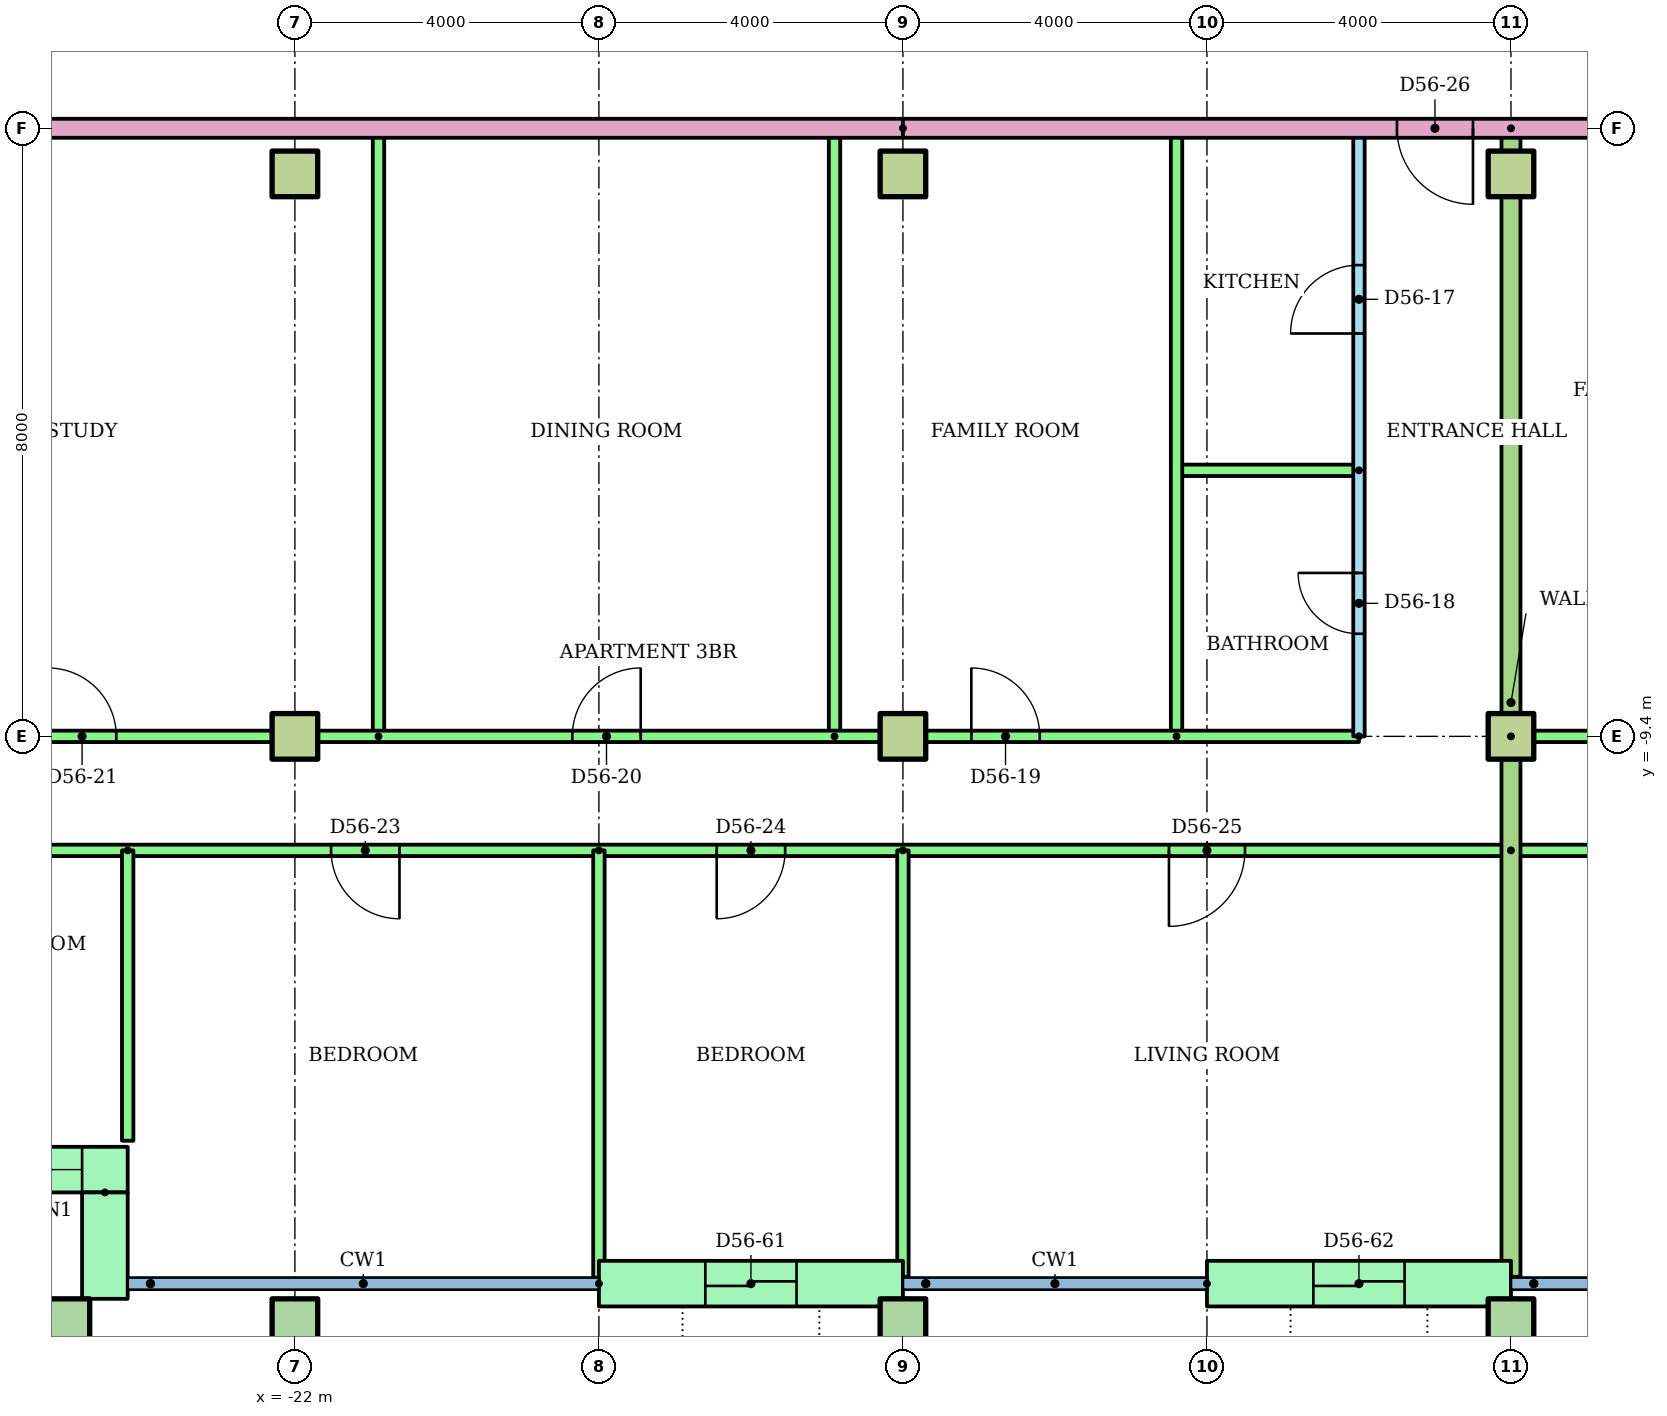
"""IFC4 building model, lengths in metres.
Left out: names, types, materials, properties, quantities, classifications, styles, units other than length and angle.
Written with IfcOpenShell. Run it as: python <this file> out.ifc"""

import sys

from ifc_helpers import new_model, si_unit, direction, frame, frame_2d, origin, origin_2d, place, context, subcontext, project, spatial, rectangle, hollow_rectangle, extrude, element, fill, save


model = new_model("IFC4")
c1 = context("Model", 3, precision=1e-05, world=origin(), true_north=direction((0.0, 1.0)))
c2 = subcontext(c1, "Body", "Model", "MODEL_VIEW")
j1 = project(units=[si_unit("LENGTHUNIT", "METRE"), si_unit("PLANEANGLEUNIT", "RADIAN")], contexts=[c1])
p1 = place(None, origin())
s1 = spatial("IfcSite", under=j1, at=p1, CompositionType="ELEMENT")
p2 = place(p1, origin())
s2 = spatial("IfcBuilding", under=s1, at=p2, CompositionType="ELEMENT")
p3 = place(p2, frame((0.0, 0.0, 217.2)))
s3 = spatial("IfcBuildingStorey", under=s2, at=p3, CompositionType="ELEMENT", Elevation=217.2)
for number, where in (
    (1, (-25.0, -17.1, 0.0)),
    (2, (-22.0, -17.1, 0.0)),
    (3, (-14.0, -17.1, 0.0)),
    (4, (-6.0, -17.1, 0.0)),
):
    element("IfcColumn", number, at=place(p3, frame(where)), inside=s3, PredefinedType="COLUMN", context=c2, shape_type="SweptSolid", body=[
        extrude(hollow_rectangle(XDim=0.6, YDim=0.6, WallThickness=0.03, at=origin_2d()), origin(), (0.0, 0.0, 1.0), 3.2),
    ])
for number, where in (
    (5, (-22.0, -9.4, 0.0)),
    (6, (-14.0, -9.4, 0.0)),
    (7, (-6.0, -9.4, 0.0)),
    (8, (-22.0, -2.0, 0.0)),
    (9, (-14.0, -2.0, 0.0)),
    (10, (-6.0, -2.0, 0.0)),
):
    element("IfcColumn", number, at=place(p3, frame(where)), inside=s3, PredefinedType="COLUMN", context=c2, shape_type="SweptSolid", body=[
        extrude(rectangle(XDim=0.6, YDim=0.6, at=origin_2d()), origin(), (0.0, 0.0, 1.0), 3.2),
    ])
p4 = place(p3, frame((-26.3, -15.1, 0.0)))
e11 = element("IfcWall", 11, at=p4, inside=s3, PredefinedType="STANDARD", context=c2, shape_type="SweptSolid", body=[
    extrude(rectangle(XDim=2.1, YDim=0.6, at=frame_2d((1.05, 0.0))), origin(), (0.0, 0.0, 1.0), 2.92),
])
p5 = place(p4, frame((0.6, 0.0, 0.9)))
e12 = element("IfcOpeningElement", 12, at=p5, cuts=e11, PredefinedType="OPENING", context=c2, shape_type="SweptSolid", body=[
    extrude(rectangle(XDim=0.9, YDim=1.5, at=frame_2d((0.45, 0.75))), frame((0.0, 0.31, 0.0), z_axis=(0.0, -1.0, 0.0), x_axis=(1.0, 0.0, 0.0)), (0.0, 0.0, 1.0), 0.62),
])
p6 = place(p3, frame((-24.5, -15.4, 0.0), z_axis=(0.0, 0.0, 1.0), x_axis=(0.0, -1.0, 0.0)))
e13 = element("IfcWall", 13, at=p6, inside=s3, PredefinedType="STANDARD", context=c2, shape_type="SweptSolid", body=[
    extrude(rectangle(XDim=1.4, YDim=0.6, at=frame_2d((0.7, 0.0))), origin(), (0.0, 0.0, 1.0), 2.92),
])
p7 = place(p3, frame((-18.0, -16.6, 0.0)))
e14 = element("IfcWall", 14, at=p7, inside=s3, PredefinedType="STANDARD", context=c2, shape_type="SweptSolid", body=[
    extrude(rectangle(XDim=4.0, YDim=0.6, at=frame_2d((2.0, 0.0))), origin(), (0.0, 0.0, 1.0), 2.92),
])
p8 = place(p7, frame((1.4, 0.0, 0.0)))
e15 = element("IfcOpeningElement", 15, at=p8, cuts=e14, PredefinedType="OPENING", context=c2, shape_type="SweptSolid", body=[
    extrude(rectangle(XDim=1.2, YDim=2.1, at=frame_2d((0.6, 1.05))), frame((0.0, 0.31, 0.0), z_axis=(0.0, -1.0, 0.0), x_axis=(1.0, 0.0, 0.0)), (0.0, 0.0, 1.0), 0.62),
])
p9 = place(p3, frame((-10.0, -16.6, 0.0)))
e16 = element("IfcWall", 16, at=p9, inside=s3, PredefinedType="STANDARD", context=c2, shape_type="SweptSolid", body=[
    extrude(rectangle(XDim=4.0, YDim=0.6, at=frame_2d((2.0, 0.0))), origin(), (0.0, 0.0, 1.0), 2.92),
])
p10 = place(p9, frame((1.4, 0.0, 0.0)))
e17 = element("IfcOpeningElement", 17, at=p10, cuts=e16, PredefinedType="OPENING", context=c2, shape_type="SweptSolid", body=[
    extrude(rectangle(XDim=1.2, YDim=2.1, at=frame_2d((0.6, 1.05))), frame((0.0, 0.31, 0.0), z_axis=(0.0, -1.0, 0.0), x_axis=(1.0, 0.0, 0.0)), (0.0, 0.0, 1.0), 0.62),
])
p11 = place(p3, frame((-8.0, -9.4, 0.0), z_axis=(0.0, 0.0, 1.0), x_axis=(0.0, 1.0, 0.0)))
e18 = element("IfcWall", 18, at=p11, inside=s3, PredefinedType="PARTITIONING", context=c2, shape_type="SweptSolid", body=[
    extrude(rectangle(XDim=8.0, YDim=0.15, at=frame_2d((4.0, 0.0))), origin(), (0.0, 0.0, 1.0), 2.4),
])
p12 = place(p11, frame((5.3, 0.0, 0.0)))
e19 = element("IfcOpeningElement", 19, at=p12, cuts=e18, PredefinedType="OPENING", context=c2, shape_type="SweptSolid", body=[
    extrude(rectangle(XDim=0.9, YDim=2.1, at=frame_2d((0.45, 1.05))), frame((0.0, 0.085, 0.0), z_axis=(0.0, -1.0, 0.0), x_axis=(1.0, 0.0, 0.0)), (0.0, 0.0, 1.0), 0.17),
])
p13 = place(p11, frame((1.35, 0.0, 0.0)))
e20 = element("IfcOpeningElement", 20, at=p13, cuts=e18, PredefinedType="OPENING", context=c2, shape_type="SweptSolid", body=[
    extrude(rectangle(XDim=0.8, YDim=2.1, at=frame_2d((0.4, 1.05))), frame((0.0, 0.085, 0.0), z_axis=(0.0, -1.0, 0.0), x_axis=(1.0, 0.0, 0.0)), (0.0, 0.0, 1.0), 0.17),
])
p14 = place(p3, frame((-8.0, -5.9, 0.0), z_axis=(0.0, 0.0, 1.0), x_axis=(-1.0, 0.0, 0.0)))
e21 = element("IfcWall", 21, at=p14, inside=s3, PredefinedType="PARTITIONING", context=c2, shape_type="SweptSolid", body=[
    extrude(rectangle(XDim=2.4, YDim=0.15, at=frame_2d((1.2, 0.0))), origin(), (0.0, 0.0, 1.0), 2.4),
])
for number, where, z_axis, x_axis in (
    (22, (-10.4, -9.4, 0.0), (0.0, 0.0, 1.0), (0.0, 1.0, 0.0)),
    (23, (-14.9, -9.4, 0.0), (0.0, 0.0, 1.0), (0.0, 1.0, 0.0)),
    (24, (-20.9, -9.4, 0.0), (0.0, 0.0, 1.0), (0.0, 1.0, 0.0)),
):
    element("IfcWall", number, at=place(p3, frame(where, z_axis=z_axis, x_axis=x_axis)), inside=s3, PredefinedType="PARTITIONING", context=c2, shape_type="SweptSolid", body=[
        extrude(rectangle(XDim=8.0, YDim=0.15, at=frame_2d((4.0, 0.0))), origin(), (0.0, 0.0, 1.0), 2.4),
    ])
p15 = place(p3, frame((-28.91, -9.4, 0.0)))
e25 = element("IfcWall", 25, at=p15, inside=s3, PredefinedType="PARTITIONING", context=c2, shape_type="SweptSolid", body=[
    extrude(rectangle(XDim=20.91, YDim=0.15, at=frame_2d((10.455, 0.0))), origin(), (0.0, 0.0, 1.0), 2.4),
])
p16 = place(p15, frame((15.81, 0.0, 0.0)))
e26 = element("IfcOpeningElement", 26, at=p16, cuts=e25, PredefinedType="OPENING", context=c2, shape_type="SweptSolid", body=[
    extrude(rectangle(XDim=0.9, YDim=2.1, at=frame_2d((0.45, 1.05))), frame((0.0, 0.085, 0.0), z_axis=(0.0, -1.0, 0.0), x_axis=(1.0, 0.0, 0.0)), (0.0, 0.0, 1.0), 0.17),
])
p17 = place(p15, frame((10.56, 0.0, 0.0)))
e27 = element("IfcOpeningElement", 27, at=p17, cuts=e25, PredefinedType="OPENING", context=c2, shape_type="SweptSolid", body=[
    extrude(rectangle(XDim=0.9, YDim=2.1, at=frame_2d((0.45, 1.05))), frame((0.0, 0.085, 0.0), z_axis=(0.0, -1.0, 0.0), x_axis=(1.0, 0.0, 0.0)), (0.0, 0.0, 1.0), 0.17),
])
p18 = place(p15, frame((3.66, 0.0, 0.0)))
e28 = element("IfcOpeningElement", 28, at=p18, cuts=e25, PredefinedType="OPENING", context=c2, shape_type="SweptSolid", body=[
    extrude(rectangle(XDim=0.9, YDim=2.1, at=frame_2d((0.45, 1.05))), frame((0.0, 0.085, 0.0), z_axis=(0.0, -1.0, 0.0), x_axis=(1.0, 0.0, 0.0)), (0.0, 0.0, 1.0), 0.17),
])
p19 = place(p3, frame((-6.0, -10.9, 0.0), z_axis=(0.0, 0.0, 1.0), x_axis=(-1.0, 0.0, 0.0)))
e29 = element("IfcWall", 29, at=p19, inside=s3, PredefinedType="PARTITIONING", context=c2, shape_type="SweptSolid", body=[
    extrude(rectangle(XDim=22.92, YDim=0.15, at=frame_2d((11.46, 0.0))), origin(), (0.0, 0.0, 1.0), 2.4),
])
p20 = place(p19, frame((20.0, 0.0, 0.0)))
e30 = element("IfcOpeningElement", 30, at=p20, cuts=e29, PredefinedType="OPENING", context=c2, shape_type="SweptSolid", body=[
    extrude(rectangle(XDim=0.9, YDim=2.1, at=frame_2d((0.45, 1.05))), frame((0.0, 0.085, 0.0), z_axis=(0.0, -1.0, 0.0), x_axis=(1.0, 0.0, 0.0)), (0.0, 0.0, 1.0), 0.17),
])
p21 = place(p19, frame((14.624, 0.0, 0.0)))
e31 = element("IfcOpeningElement", 31, at=p21, cuts=e29, PredefinedType="OPENING", context=c2, shape_type="SweptSolid", body=[
    extrude(rectangle(XDim=0.9, YDim=2.1, at=frame_2d((0.45, 1.05))), frame((0.0, 0.085, 0.0), z_axis=(0.0, -1.0, 0.0), x_axis=(1.0, 0.0, 0.0)), (0.0, 0.0, 1.0), 0.17),
])
p22 = place(p19, frame((9.55, 0.0, 0.0)))
e32 = element("IfcOpeningElement", 32, at=p22, cuts=e29, PredefinedType="OPENING", context=c2, shape_type="SweptSolid", body=[
    extrude(rectangle(XDim=0.9, YDim=2.1, at=frame_2d((0.45, 1.05))), frame((0.0, 0.085, 0.0), z_axis=(0.0, -1.0, 0.0), x_axis=(1.0, 0.0, 0.0)), (0.0, 0.0, 1.0), 0.17),
])
p23 = place(p19, frame((3.5, 0.0, 0.0)))
e33 = element("IfcOpeningElement", 33, at=p23, cuts=e29, PredefinedType="OPENING", context=c2, shape_type="SweptSolid", body=[
    extrude(rectangle(XDim=1.0, YDim=2.1, at=frame_2d((0.5, 1.05))), frame((0.0, 0.085, 0.0), z_axis=(0.0, -1.0, 0.0), x_axis=(1.0, 0.0, 0.0)), (0.0, 0.0, 1.0), 0.17),
])
p24 = place(p3, frame((-24.2, -10.9, 0.0), z_axis=(0.0, 0.0, 1.0), x_axis=(0.0, -1.0, 0.0)))
e34 = element("IfcWall", 34, at=p24, inside=s3, PredefinedType="PARTITIONING", context=c2, shape_type="SweptSolid", body=[
    extrude(rectangle(XDim=3.82, YDim=0.15, at=frame_2d((1.91, 0.0))), origin(), (0.0, 0.0, 1.0), 2.4),
])
p25 = place(p3, frame((-18.0, -10.9, 0.0), z_axis=(0.0, 0.0, 1.0), x_axis=(0.0, -1.0, 0.0)))
e35 = element("IfcWall", 35, at=p25, inside=s3, PredefinedType="PARTITIONING", context=c2, shape_type="SweptSolid", body=[
    extrude(rectangle(XDim=5.621, YDim=0.15, at=frame_2d((2.811, 0.0))), origin(), (0.0, 0.0, 1.0), 2.4),
])
p26 = place(p3, frame((-14.0, -10.9, 0.0), z_axis=(0.0, 0.0, 1.0), x_axis=(0.0, -1.0, 0.0)))
e36 = element("IfcWall", 36, at=p26, inside=s3, PredefinedType="PARTITIONING", context=c2, shape_type="SweptSolid", body=[
    extrude(rectangle(XDim=5.61, YDim=0.15, at=frame_2d((2.805, 0.0))), origin(), (0.0, 0.0, 1.0), 2.4),
])
p27 = place(p3, frame((-6.0, -9.4, 0.0)))
e37 = element("IfcWall", 37, at=p27, inside=s3, PredefinedType="PARTITIONING", context=c2, shape_type="SweptSolid", body=[
    extrude(rectangle(XDim=6.0, YDim=0.15, at=frame_2d((3.0, 0.0))), origin(), (0.0, 0.0, 1.0), 2.4),
])
p28 = place(p27, frame((1.35, 0.0, 0.0)))
e38 = element("IfcOpeningElement", 38, at=p28, cuts=e37, PredefinedType="OPENING", context=c2, shape_type="SweptSolid", body=[
    extrude(rectangle(XDim=0.9, YDim=2.1, at=frame_2d((0.45, 1.05))), frame((0.0, 0.085, 0.0), z_axis=(0.0, -1.0, 0.0), x_axis=(1.0, 0.0, 0.0)), (0.0, 0.0, 1.0), 0.17),
])
p29 = place(p3, frame((2.0, -10.9, 0.0), z_axis=(0.0, 0.0, 1.0), x_axis=(-1.0, 0.0, 0.0)))
e39 = element("IfcWall", 39, at=p29, inside=s3, PredefinedType="PARTITIONING", context=c2, shape_type="SweptSolid", body=[
    extrude(rectangle(XDim=8.0, YDim=0.15, at=frame_2d((4.0, 0.0))), origin(), (0.0, 0.0, 1.0), 2.4),
])
p30 = place(p29, frame((5.55, 0.0, 0.0)))
e40 = element("IfcOpeningElement", 40, at=p30, cuts=e39, PredefinedType="OPENING", context=c2, shape_type="SweptSolid", body=[
    extrude(rectangle(XDim=0.9, YDim=2.1, at=frame_2d((0.45, 1.05))), frame((0.0, 0.085, 0.0), z_axis=(0.0, -1.0, 0.0), x_axis=(1.0, 0.0, 0.0)), (0.0, 0.0, 1.0), 0.17),
])
p31 = place(p29, frame((1.5, 0.0, 0.0)))
e41 = element("IfcOpeningElement", 41, at=p31, cuts=e39, PredefinedType="OPENING", context=c2, shape_type="SweptSolid", body=[
    extrude(rectangle(XDim=1.0, YDim=2.1, at=frame_2d((0.5, 1.05))), frame((0.0, 0.085, 0.0), z_axis=(0.0, -1.0, 0.0), x_axis=(1.0, 0.0, 0.0)), (0.0, 0.0, 1.0), 0.17),
])
p32 = place(p3, frame((-6.0, -1.4, 0.0), z_axis=(0.0, 0.0, 1.0), x_axis=(0.0, -1.0, 0.0)))
e42 = element("IfcWall", 42, at=p32, inside=s3, PredefinedType="PARTITIONING", context=c2, shape_type="SweptSolid", body=[
    extrude(rectangle(XDim=15.11, YDim=0.25, at=frame_2d((7.555, 0.0))), origin(), (0.0, 0.0, 1.0), 2.4),
])
p33 = place(p3, frame((-14.0, -1.4, 0.0), z_axis=(0.0, 0.0, 1.0), x_axis=(-1.0, 0.0, 0.0)))
e43 = element("IfcWall", 43, at=p33, inside=s3, PredefinedType="PARTITIONING", context=c2, shape_type="SweptSolid", body=[
    extrude(rectangle(XDim=14.92, YDim=0.25, at=frame_2d((7.46, 0.0))), origin(), (0.0, 0.0, 1.0), 2.4),
])
p34 = place(p3, frame((14.0, -1.4, 0.0), z_axis=(0.0, 0.0, 1.0), x_axis=(-1.0, 0.0, 0.0)))
e44 = element("IfcWall", 44, at=p34, inside=s3, PredefinedType="PARTITIONING", context=c2, shape_type="SweptSolid", body=[
    extrude(rectangle(XDim=28.0, YDim=0.25, at=frame_2d((14.0, 0.0))), origin(), (0.0, 0.0, 1.0), 2.4),
])
p35 = place(p34, frame((20.5, 0.0, 0.0)))
e45 = element("IfcOpeningElement", 45, at=p35, cuts=e44, PredefinedType="OPENING", context=c2, shape_type="SweptSolid", body=[
    extrude(rectangle(XDim=1.0, YDim=2.1, at=frame_2d((0.5, 1.05))), frame((0.0, 0.135, 0.0), z_axis=(0.0, -1.0, 0.0), x_axis=(1.0, 0.0, 0.0)), (0.0, 0.0, 1.0), 0.27),
])
p36 = place(p34, frame((12.5, 0.0, 0.0)))
e46 = element("IfcOpeningElement", 46, at=p36, cuts=e44, PredefinedType="OPENING", context=c2, shape_type="SweptSolid", body=[
    extrude(rectangle(XDim=1.0, YDim=2.1, at=frame_2d((0.5, 1.05))), frame((0.0, 0.135, 0.0), z_axis=(0.0, -1.0, 0.0), x_axis=(1.0, 0.0, 0.0)), (0.0, 0.0, 1.0), 0.27),
])
p37 = place(p34, frame((10.5, 0.0, 0.0)))
e47 = element("IfcOpeningElement", 47, at=p37, cuts=e44, PredefinedType="OPENING", context=c2, shape_type="SweptSolid", body=[
    extrude(rectangle(XDim=1.0, YDim=2.1, at=frame_2d((0.5, 1.05))), frame((0.0, 0.135, 0.0), z_axis=(0.0, -1.0, 0.0), x_axis=(1.0, 0.0, 0.0)), (0.0, 0.0, 1.0), 0.27),
])
p38 = place(p5, origin())
e48 = element("IfcWindow", 48, at=p38, inside=s3, PartitioningType="SINGLE_PANEL", PredefinedType="WINDOW", context=c2, shape_type="SweptSolid", body=[
    extrude(rectangle(XDim=0.9, YDim=1.5, at=frame_2d((0.45, 0.75))), frame((0.0, 0.03, 0.0), z_axis=(0.0, -1.0, 0.0), x_axis=(1.0, 0.0, 0.0)), (0.0, 0.0, 1.0), 0.06),
])
fill(e12, e48)
p39 = place(p12, origin())
e49 = element("IfcDoor", 49, at=p39, inside=s3, OperationType="SINGLE_SWING_LEFT", PredefinedType="DOOR", context=c2, shape_type="SweptSolid", body=[
    extrude(rectangle(XDim=0.9, YDim=2.1, at=frame_2d((0.45, 1.05))), frame((0.0, 0.025, 0.0), z_axis=(0.0, -1.0, 0.0), x_axis=(1.0, 0.0, 0.0)), (0.0, 0.0, 1.0), 0.05),
])
fill(e19, e49)
p40 = place(p13, origin())
e50 = element("IfcDoor", 50, at=p40, inside=s3, OperationType="SINGLE_SWING_RIGHT", PredefinedType="DOOR", context=c2, shape_type="SweptSolid", body=[
    extrude(rectangle(XDim=0.8, YDim=2.1, at=frame_2d((0.4, 1.05))), frame((0.0, 0.025, 0.0), z_axis=(0.0, -1.0, 0.0), x_axis=(1.0, 0.0, 0.0)), (0.0, 0.0, 1.0), 0.05),
])
fill(e20, e50)
p41 = place(p16, origin())
e51 = element("IfcDoor", 51, at=p41, inside=s3, OperationType="SINGLE_SWING_LEFT", PredefinedType="DOOR", context=c2, shape_type="SweptSolid", body=[
    extrude(rectangle(XDim=0.9, YDim=2.1, at=frame_2d((0.45, 1.05))), frame((0.0, 0.025, 0.0), z_axis=(0.0, -1.0, 0.0), x_axis=(1.0, 0.0, 0.0)), (0.0, 0.0, 1.0), 0.05),
])
fill(e26, e51)
p42 = place(p17, origin())
e52 = element("IfcDoor", 52, at=p42, inside=s3, OperationType="SINGLE_SWING_RIGHT", PredefinedType="DOOR", context=c2, shape_type="SweptSolid", body=[
    extrude(rectangle(XDim=0.9, YDim=2.1, at=frame_2d((0.45, 1.05))), frame((0.0, 0.025, 0.0), z_axis=(0.0, -1.0, 0.0), x_axis=(1.0, 0.0, 0.0)), (0.0, 0.0, 1.0), 0.05),
])
fill(e27, e52)
p43 = place(p18, origin())
e53 = element("IfcDoor", 53, at=p43, inside=s3, OperationType="SINGLE_SWING_LEFT", PredefinedType="DOOR", context=c2, shape_type="SweptSolid", body=[
    extrude(rectangle(XDim=0.9, YDim=2.1, at=frame_2d((0.45, 1.05))), frame((0.0, 0.025, 0.0), z_axis=(0.0, -1.0, 0.0), x_axis=(1.0, 0.0, 0.0)), (0.0, 0.0, 1.0), 0.05),
])
fill(e28, e53)
p44 = place(p21, origin())
e54 = element("IfcDoor", 54, at=p44, inside=s3, OperationType="SINGLE_SWING_LEFT", PredefinedType="DOOR", context=c2, shape_type="SweptSolid", body=[
    extrude(rectangle(XDim=0.9, YDim=2.1, at=frame_2d((0.45, 1.05))), frame((0.0, 0.025, 0.0), z_axis=(0.0, -1.0, 0.0), x_axis=(1.0, 0.0, 0.0)), (0.0, 0.0, 1.0), 0.05),
])
fill(e31, e54)
p45 = place(p22, origin())
e55 = element("IfcDoor", 55, at=p45, inside=s3, OperationType="SINGLE_SWING_RIGHT", PredefinedType="DOOR", context=c2, shape_type="SweptSolid", body=[
    extrude(rectangle(XDim=0.9, YDim=2.1, at=frame_2d((0.45, 1.05))), frame((0.0, 0.025, 0.0), z_axis=(0.0, -1.0, 0.0), x_axis=(1.0, 0.0, 0.0)), (0.0, 0.0, 1.0), 0.05),
])
fill(e32, e55)
p46 = place(p23, origin())
e56 = element("IfcDoor", 56, at=p46, inside=s3, OperationType="SINGLE_SWING_RIGHT", PredefinedType="DOOR", context=c2, shape_type="SweptSolid", body=[
    extrude(rectangle(XDim=1.0, YDim=2.1, at=frame_2d((0.5, 1.05))), frame((0.0, 0.025, 0.0), z_axis=(0.0, -1.0, 0.0), x_axis=(1.0, 0.0, 0.0)), (0.0, 0.0, 1.0), 0.05),
])
fill(e33, e56)
p47 = place(p35, origin())
e57 = element("IfcDoor", 57, at=p47, inside=s3, OperationType="SINGLE_SWING_LEFT", PredefinedType="DOOR", context=c2, shape_type="SweptSolid", body=[
    extrude(rectangle(XDim=1.0, YDim=2.1, at=frame_2d((0.5, 1.05))), frame((0.0, 0.025, 0.0), z_axis=(0.0, -1.0, 0.0), x_axis=(1.0, 0.0, 0.0)), (0.0, 0.0, 1.0), 0.05),
])
fill(e45, e57)
p48 = place(p8, origin())
e58 = element("IfcDoor", 58, at=p48, inside=s3, OperationType="SLIDING_TO_LEFT", PredefinedType="DOOR", context=c2, shape_type="SweptSolid", body=[
    extrude(rectangle(XDim=1.2, YDim=2.1, at=frame_2d((0.6, 1.05))), frame((0.0, 0.025, 0.0), z_axis=(0.0, -1.0, 0.0), x_axis=(1.0, 0.0, 0.0)), (0.0, 0.0, 1.0), 0.05),
])
fill(e15, e58)
p49 = place(p10, origin())
e59 = element("IfcDoor", 59, at=p49, inside=s3, OperationType="SLIDING_TO_LEFT", PredefinedType="DOOR", context=c2, shape_type="SweptSolid", body=[
    extrude(rectangle(XDim=1.2, YDim=2.1, at=frame_2d((0.6, 1.05))), frame((0.0, 0.025, 0.0), z_axis=(0.0, -1.0, 0.0), x_axis=(1.0, 0.0, 0.0)), (0.0, 0.0, 1.0), 0.05),
])
fill(e17, e59)
save(model, sys.argv[1])
